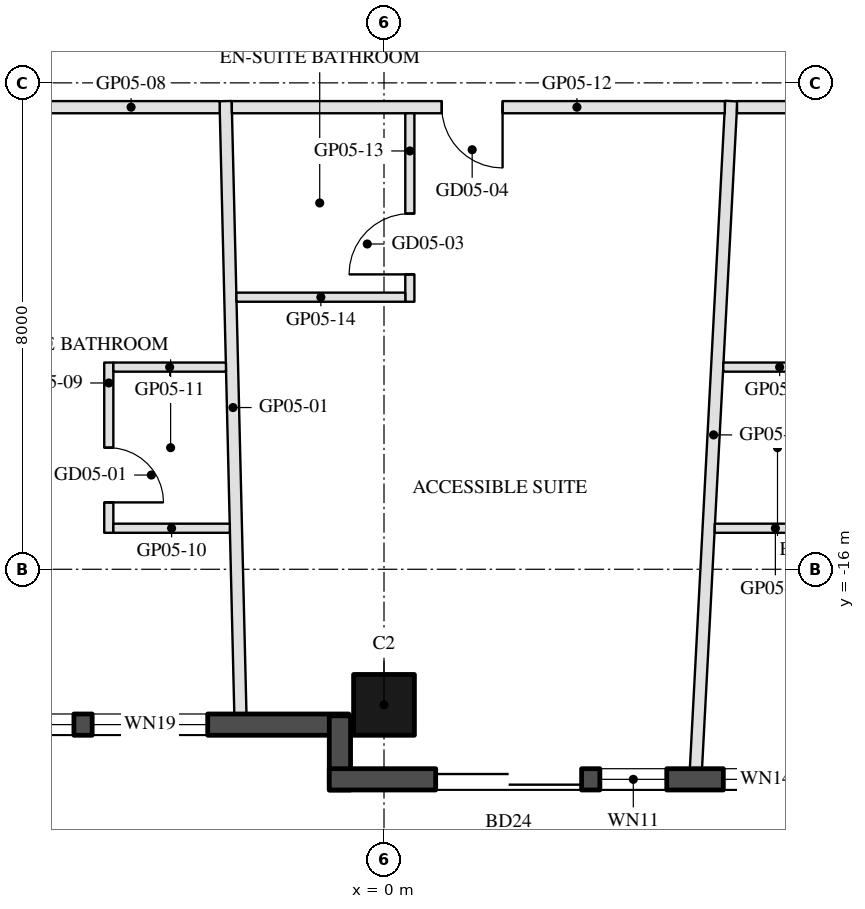
"""IFC4 building model, lengths in metres.
Left out: names, types, materials, properties, quantities, classifications, styles, units other than length and angle.
Written with IfcOpenShell. Run it as: python <this file> out.ifc"""

import sys

from ifc_helpers import new_model, si_unit, direction, frame, frame_2d, origin, origin_2d, place, context, subcontext, project, spatial, rectangle, hollow_rectangle, extrude, element, fill, save


model = new_model("IFC4")
c1 = context("Model", 3, precision=1e-05, world=origin(), true_north=direction((0.0, 1.0)))
c2 = subcontext(c1, "Body", "Model", "MODEL_VIEW")
j1 = project(units=[si_unit("LENGTHUNIT", "METRE"), si_unit("PLANEANGLEUNIT", "RADIAN")], contexts=[c1])
p1 = place(None, origin())
s1 = spatial("IfcSite", under=j1, at=p1, CompositionType="ELEMENT")
p2 = place(p1, origin())
s2 = spatial("IfcBuilding", under=s1, at=p2, CompositionType="ELEMENT")
p3 = place(p2, frame((0.0, 0.0, 79.8)))
s3 = spatial("IfcBuildingStorey", under=s2, at=p3, CompositionType="ELEMENT", Elevation=79.8)
p4 = place(p3, frame((0.0, -18.23, 0.0), z_axis=(0.0, 0.0, 1.0), x_axis=(-1.0, 0.0, 0.0)))
e1 = element("IfcColumn", 1, at=p4, inside=s3, PredefinedType="COLUMN", context=c2, shape_type="SweptSolid", body=[
    extrude(hollow_rectangle(XDim=1.0, YDim=1.0, WallThickness=0.045, at=origin_2d()), origin(), (0.0, 0.0, 1.0), 3.7),
])
p5 = place(p3, frame((-7.32, -18.555, 0.0), z_axis=(0.0, 0.0, 1.0), x_axis=(1.0, 0.0, 0.0)))
e2 = element("IfcWall", 2, at=p5, inside=s3, PredefinedType="SOLIDWALL", context=c2, shape_type="SweptSolid", body=[
    extrude(rectangle(XDim=6.74, YDim=0.35, at=frame_2d((3.37, 0.0))), origin(), (0.0, 0.0, 1.0), 3.55),
])
p6 = place(p5, frame((0.32, 0.0, 0.3)))
e3 = element("IfcOpeningElement", 3, at=p6, cuts=e2, PredefinedType="OPENING", context=c2, shape_type="SweptSolid", body=[
    extrude(rectangle(XDim=1.9, YDim=2.65, at=frame_2d((0.95, 1.325))), frame((0.0, 0.185, 0.0), z_axis=(0.0, -1.0, 0.0), x_axis=(1.0, 0.0, 0.0)), (0.0, 0.0, 1.0), 0.37),
])
p7 = place(p5, frame((2.521, 0.0, 0.3)))
e4 = element("IfcOpeningElement", 4, at=p7, cuts=e2, PredefinedType="OPENING", context=c2, shape_type="SweptSolid", body=[
    extrude(rectangle(XDim=1.9, YDim=2.65, at=frame_2d((0.95, 1.325))), frame((0.0, 0.185, 0.0), z_axis=(0.0, -1.0, 0.0), x_axis=(1.0, 0.0, 0.0)), (0.0, 0.0, 1.0), 0.37),
])
p8 = place(p3, frame((-0.725, -18.41, 0.0), z_axis=(0.0, 0.0, 1.0), x_axis=(0.0, -1.0, 0.0)))
e5 = element("IfcWall", 5, at=p8, inside=s3, PredefinedType="SOLIDWALL", context=c2, shape_type="SweptSolid", body=[
    extrude(rectangle(XDim=1.22, YDim=0.35, at=frame_2d((0.61, 0.0))), origin(), (0.0, 0.0, 1.0), 3.55),
])
p9 = place(p3, frame((-0.9, -19.455, 0.0), z_axis=(0.0, 0.0, 1.0), x_axis=(1.0, 0.0, 0.0)))
e6 = element("IfcWall", 6, at=p9, inside=s3, PredefinedType="SOLIDWALL", context=c2, shape_type="SweptSolid", body=[
    extrude(rectangle(XDim=9.7, YDim=0.35, at=frame_2d((4.85, 0.0))), origin(), (0.0, 0.0, 1.0), 3.55),
])
p10 = place(p9, frame((1.75, 0.0, 0.0)))
e7 = element("IfcOpeningElement", 7, at=p10, cuts=e6, PredefinedType="OPENING", context=c2, shape_type="SweptSolid", body=[
    extrude(rectangle(XDim=2.4, YDim=2.4, at=frame_2d((1.2, 1.2))), frame((0.0, 0.185, 0.0), z_axis=(0.0, -1.0, 0.0), x_axis=(1.0, 0.0, 0.0)), (0.0, 0.0, 1.0), 0.37),
])
p11 = place(p9, frame((4.45, 0.0, 0.3)))
e8 = element("IfcOpeningElement", 8, at=p11, cuts=e6, PredefinedType="OPENING", context=c2, shape_type="SweptSolid", body=[
    extrude(rectangle(XDim=1.1, YDim=2.65, at=frame_2d((0.55, 1.325))), frame((0.0, 0.185, 0.0), z_axis=(0.0, -1.0, 0.0), x_axis=(1.0, 0.0, 0.0)), (0.0, 0.0, 1.0), 0.37),
])
p12 = place(p9, frame((6.48, 0.0, 0.3)))
e9 = element("IfcOpeningElement", 9, at=p12, cuts=e6, PredefinedType="OPENING", context=c2, shape_type="SweptSolid", body=[
    extrude(rectangle(XDim=1.4, YDim=2.65, at=frame_2d((0.7, 1.325))), frame((0.0, 0.185, 0.0), z_axis=(0.0, -1.0, 0.0), x_axis=(1.0, 0.0, 0.0)), (0.0, 0.0, 1.0), 0.37),
])
p13 = place(p3, frame((-2.362, -18.38, 0.0), z_axis=(0.0, 0.0, 1.0), x_axis=(-0.024092600153, 0.999709731181, 0.0)))
e10 = element("IfcWall", 10, at=p13, inside=s3, PredefinedType="PARTITIONING", context=c2, shape_type="SweptSolid", body=[
    extrude(rectangle(XDim=10.083, YDim=0.2, at=frame_2d((5.042, 0.0))), origin(), (0.0, 0.0, 1.0), 2.96),
])
p14 = place(p3, frame((5.13, -19.28, 0.0), z_axis=(0.0, 0.0, 1.0), x_axis=(0.052823378142, 0.998603870772, 0.0)))
e11 = element("IfcWall", 11, at=p14, inside=s3, PredefinedType="PARTITIONING", context=c2, shape_type="SweptSolid", body=[
    extrude(rectangle(XDim=10.995, YDim=0.2, at=frame_2d((5.498, 0.0))), origin(), (0.0, 0.0, 1.0), 2.96),
])
p15 = place(p3, frame((-2.702, -8.4, 0.0), z_axis=(0.0, 0.0, 1.0), x_axis=(-1.0, 0.0, 0.0)))
e12 = element("IfcWall", 12, at=p15, inside=s3, PredefinedType="PARTITIONING", context=c2, shape_type="SweptSolid", body=[
    extrude(rectangle(XDim=7.286, YDim=0.2, at=frame_2d((3.643, 0.0))), origin(), (0.0, 0.0, 1.0), 2.95),
])
p16 = place(p15, frame((3.143, 0.0, 0.0)))
e13 = element("IfcOpeningElement", 13, at=p16, cuts=e12, PredefinedType="OPENING", context=c2, shape_type="SweptSolid", body=[
    extrude(rectangle(XDim=1.0, YDim=2.1, at=frame_2d((0.5, 1.05))), frame((0.0, 0.11, 0.0), z_axis=(0.0, -1.0, 0.0), x_axis=(1.0, 0.0, 0.0)), (0.0, 0.0, 1.0), 0.22),
])
p17 = place(p3, frame((-4.526, -12.6, 0.0), z_axis=(0.0, 0.0, 1.0), x_axis=(0.0, -1.0, 0.0)))
e14 = element("IfcWall", 14, at=p17, inside=s3, PredefinedType="PARTITIONING", context=c2, shape_type="SweptSolid", body=[
    extrude(rectangle(XDim=2.8, YDim=0.15, at=frame_2d((1.4, 0.0))), origin(), (0.0, 0.0, 1.0), 3.55),
])
p18 = place(p17, frame((1.4, 0.0, 0.0)))
e15 = element("IfcOpeningElement", 15, at=p18, cuts=e14, PredefinedType="OPENING", context=c2, shape_type="SweptSolid", body=[
    extrude(rectangle(XDim=0.9, YDim=2.1, at=frame_2d((0.45, 1.05))), frame((0.0, 0.085, 0.0), z_axis=(0.0, -1.0, 0.0), x_axis=(1.0, 0.0, 0.0)), (0.0, 0.0, 1.0), 0.17),
])
p19 = place(p3, frame((-4.451, -15.325, 0.0), z_axis=(0.0, 0.0, 1.0), x_axis=(1.0, 0.0, 0.0)))
e16 = element("IfcWall", 16, at=p19, inside=s3, PredefinedType="PARTITIONING", context=c2, shape_type="SweptSolid", body=[
    extrude(rectangle(XDim=1.916, YDim=0.15, at=frame_2d((0.958, 0.0))), origin(), (0.0, 0.0, 1.0), 2.95),
])
p20 = place(p3, frame((-4.451, -12.675, 0.0), z_axis=(0.0, 0.0, 1.0), x_axis=(1.0, 0.0, 0.0)))
e17 = element("IfcWall", 17, at=p20, inside=s3, PredefinedType="PARTITIONING", context=c2, shape_type="SweptSolid", body=[
    extrude(rectangle(XDim=1.852, YDim=0.15, at=frame_2d((0.926, 0.0))), origin(), (0.0, 0.0, 1.0), 2.95),
])
p21 = place(p3, frame((5.605, -8.4, 0.0), z_axis=(0.0, 0.0, 1.0), x_axis=(-1.0, 0.0, 0.0)))
e18 = element("IfcWall", 18, at=p21, inside=s3, PredefinedType="PARTITIONING", context=c2, shape_type="SweptSolid", body=[
    extrude(rectangle(XDim=8.107, YDim=0.2, at=frame_2d((4.054, 0.0))), origin(), (0.0, 0.0, 1.0), 2.95),
])
p22 = place(p21, frame((3.655, 0.0, 0.0)))
e19 = element("IfcOpeningElement", 19, at=p22, cuts=e18, PredefinedType="OPENING", context=c2, shape_type="SweptSolid", body=[
    extrude(rectangle(XDim=1.0, YDim=2.1, at=frame_2d((0.5, 1.05))), frame((0.0, 0.11, 0.0), z_axis=(0.0, -1.0, 0.0), x_axis=(1.0, 0.0, 0.0)), (0.0, 0.0, 1.0), 0.22),
])
p23 = place(p3, frame((0.425, -11.6, 0.0), z_axis=(0.0, 0.0, 1.0), x_axis=(0.0, 1.0, 0.0)))
e20 = element("IfcWall", 20, at=p23, inside=s3, PredefinedType="PARTITIONING", context=c2, shape_type="SweptSolid", body=[
    extrude(rectangle(XDim=3.1, YDim=0.15, at=frame_2d((1.55, 0.0))), origin(), (0.0, 0.0, 1.0), 3.55),
])
p24 = place(p23, frame((0.45, 0.0, 0.0)))
e21 = element("IfcOpeningElement", 21, at=p24, cuts=e20, PredefinedType="OPENING", context=c2, shape_type="SweptSolid", body=[
    extrude(rectangle(XDim=1.0, YDim=2.1, at=frame_2d((0.5, 1.05))), frame((0.0, 0.085, 0.0), z_axis=(0.0, -1.0, 0.0), x_axis=(1.0, 0.0, 0.0)), (0.0, 0.0, 1.0), 0.17),
])
p25 = place(p3, frame((-2.427, -11.525, 0.0), z_axis=(0.0, 0.0, 1.0), x_axis=(1.0, 0.0, 0.0)))
e22 = element("IfcWall", 22, at=p25, inside=s3, PredefinedType="PARTITIONING", context=c2, shape_type="SweptSolid", body=[
    extrude(rectangle(XDim=2.777, YDim=0.15, at=frame_2d((1.389, 0.0))), origin(), (0.0, 0.0, 1.0), 2.95),
])
p26 = place(p3, frame((9.988, -8.4, 0.0), z_axis=(0.0, 0.0, 1.0), x_axis=(-1.0, 0.0, 0.0)))
e23 = element("IfcWall", 23, at=p26, inside=s3, PredefinedType="PARTITIONING", context=c2, shape_type="SweptSolid", body=[
    extrude(rectangle(XDim=4.183, YDim=0.2, at=frame_2d((2.091, 0.0))), origin(), (0.0, 0.0, 1.0), 2.95),
])
p27 = place(p26, frame((1.591, 0.0, 0.0)))
e24 = element("IfcOpeningElement", 24, at=p27, cuts=e23, PredefinedType="OPENING", context=c2, shape_type="SweptSolid", body=[
    extrude(rectangle(XDim=1.0, YDim=2.1, at=frame_2d((0.5, 1.05))), frame((0.0, 0.11, 0.0), z_axis=(0.0, -1.0, 0.0), x_axis=(1.0, 0.0, 0.0)), (0.0, 0.0, 1.0), 0.22),
])
p28 = place(p3, frame((5.439, -15.325, 0.0), z_axis=(0.0, 0.0, 1.0), x_axis=(1.0, 0.0, 0.0)))
e25 = element("IfcWall", 25, at=p28, inside=s3, PredefinedType="PARTITIONING", context=c2, shape_type="SweptSolid", body=[
    extrude(rectangle(XDim=1.994, YDim=0.15, at=frame_2d((0.997, 0.0))), origin(), (0.0, 0.0, 1.0), 3.55),
])
p29 = place(p3, frame((5.579, -12.675, 0.0), z_axis=(0.0, 0.0, 1.0), x_axis=(1.0, 0.0, 0.0)))
e26 = element("IfcWall", 26, at=p29, inside=s3, PredefinedType="PARTITIONING", context=c2, shape_type="SweptSolid", body=[
    extrude(rectangle(XDim=1.854, YDim=0.15, at=frame_2d((0.927, 0.0))), origin(), (0.0, 0.0, 1.0), 3.55),
])
p30 = place(p6, origin())
e27 = element("IfcWindow", 27, at=p30, inside=s3, PartitioningType="SINGLE_PANEL", PredefinedType="WINDOW", context=c2, shape_type="SweptSolid", body=[
    extrude(rectangle(XDim=1.9, YDim=2.65, at=frame_2d((0.95, 1.325))), frame((0.0, 0.03, 0.0), z_axis=(0.0, -1.0, 0.0), x_axis=(1.0, 0.0, 0.0)), (0.0, 0.0, 1.0), 0.06),
])
fill(e3, e27)
p31 = place(p7, origin())
e28 = element("IfcWindow", 28, at=p31, inside=s3, PartitioningType="SINGLE_PANEL", PredefinedType="WINDOW", context=c2, shape_type="SweptSolid", body=[
    extrude(rectangle(XDim=1.9, YDim=2.65, at=frame_2d((0.95, 1.325))), frame((0.0, 0.03, 0.0), z_axis=(0.0, -1.0, 0.0), x_axis=(1.0, 0.0, 0.0)), (0.0, 0.0, 1.0), 0.06),
])
fill(e4, e28)
p32 = place(p10, frame((2.4, 0.0, 0.0), z_axis=(0.0, 0.0, 1.0), x_axis=(-1.0, 0.0, 0.0)))
e29 = element("IfcDoor", 29, at=p32, inside=s3, OperationType="SLIDING_TO_LEFT", PredefinedType="DOOR", context=c2, shape_type="SweptSolid", body=[
    extrude(rectangle(XDim=2.4, YDim=2.4, at=frame_2d((1.2, 1.2))), frame((0.0, 0.025, 0.0), z_axis=(0.0, -1.0, 0.0), x_axis=(1.0, 0.0, 0.0)), (0.0, 0.0, 1.0), 0.05),
])
fill(e7, e29)
p33 = place(p11, origin())
e30 = element("IfcWindow", 30, at=p33, inside=s3, PartitioningType="SINGLE_PANEL", PredefinedType="WINDOW", context=c2, shape_type="SweptSolid", body=[
    extrude(rectangle(XDim=1.1, YDim=2.65, at=frame_2d((0.55, 1.325))), frame((0.0, 0.03, 0.0), z_axis=(0.0, -1.0, 0.0), x_axis=(1.0, 0.0, 0.0)), (0.0, 0.0, 1.0), 0.06),
])
fill(e8, e30)
p34 = place(p12, origin())
e31 = element("IfcWindow", 31, at=p34, inside=s3, PartitioningType="SINGLE_PANEL", PredefinedType="WINDOW", context=c2, shape_type="SweptSolid", body=[
    extrude(rectangle(XDim=1.4, YDim=2.65, at=frame_2d((0.7, 1.325))), frame((0.0, 0.03, 0.0), z_axis=(0.0, -1.0, 0.0), x_axis=(1.0, 0.0, 0.0)), (0.0, 0.0, 1.0), 0.06),
])
fill(e9, e31)
p35 = place(p18, origin())
e32 = element("IfcDoor", 32, at=p35, inside=s3, OperationType="SINGLE_SWING_RIGHT", PredefinedType="DOOR", context=c2, shape_type="SweptSolid", body=[
    extrude(rectangle(XDim=0.9, YDim=2.1, at=frame_2d((0.45, 1.05))), frame((0.0, 0.025, 0.0), z_axis=(0.0, -1.0, 0.0), x_axis=(1.0, 0.0, 0.0)), (0.0, 0.0, 1.0), 0.05),
])
fill(e15, e32)
p36 = place(p24, origin())
e33 = element("IfcDoor", 33, at=p36, inside=s3, OperationType="SINGLE_SWING_LEFT", PredefinedType="DOOR", context=c2, shape_type="SweptSolid", body=[
    extrude(rectangle(XDim=1.0, YDim=2.1, at=frame_2d((0.5, 1.05))), frame((0.0, 0.025, 0.0), z_axis=(0.0, -1.0, 0.0), x_axis=(1.0, 0.0, 0.0)), (0.0, 0.0, 1.0), 0.05),
])
fill(e21, e33)
p37 = place(p22, origin())
e34 = element("IfcDoor", 34, at=p37, inside=s3, OperationType="SINGLE_SWING_LEFT", PredefinedType="DOOR", context=c2, shape_type="SweptSolid", body=[
    extrude(rectangle(XDim=1.0, YDim=2.1, at=frame_2d((0.5, 1.05))), frame((0.0, 0.025, 0.0), z_axis=(0.0, -1.0, 0.0), x_axis=(1.0, 0.0, 0.0)), (0.0, 0.0, 1.0), 0.05),
])
fill(e19, e34)
save(model, sys.argv[1])
